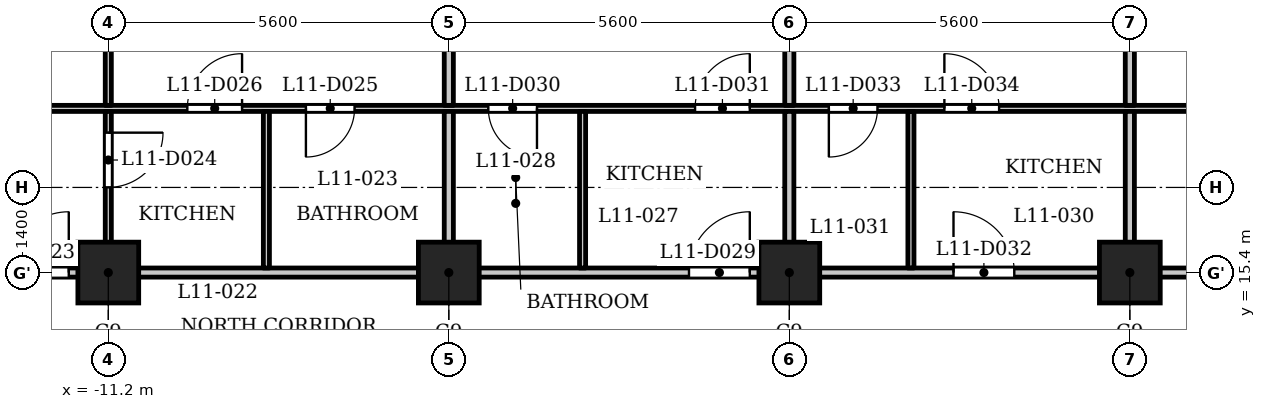
"""IFC4 building model, lengths in metres.
Left out: names, types, materials, properties, quantities, classifications, styles, units other than length and angle.
Written with IfcOpenShell. Run it as: python <this file> out.ifc"""

import sys

from ifc_helpers import new_model, si_unit, direction, frame, frame_2d, origin, origin_2d, place, context, subcontext, project, spatial, rectangle, extrude, element, fill, save


model = new_model("IFC4")
c1 = context("Model", 3, precision=1e-05, world=origin(), true_north=direction((0.0, 1.0)))
c2 = subcontext(c1, "Body", "Model", "MODEL_VIEW")
j1 = project(units=[si_unit("LENGTHUNIT", "METRE"), si_unit("PLANEANGLEUNIT", "RADIAN")], contexts=[c1])
p1 = place(None, origin())
s1 = spatial("IfcSite", under=j1, at=p1, CompositionType="ELEMENT")
p2 = place(p1, origin())
s2 = spatial("IfcBuilding", under=s1, at=p2, CompositionType="ELEMENT")
p3 = place(p2, frame((0.0, 0.0, 48.0)))
s3 = spatial("IfcBuildingStorey", under=s2, at=p3, CompositionType="ELEMENT", Elevation=48.0)
for number, where, z_axis, x_axis in (
    (1, (-11.2, 15.4, 0.0), (0.0, 0.0, 1.0), (1.0, 0.0, 0.0)),
    (2, (-5.6, 15.4, 0.0), (0.0, 0.0, 1.0), (1.0, 0.0, 0.0)),
    (3, (0.0, 15.4, 0.0), (0.0, 0.0, 1.0), (1.0, 0.0, 0.0)),
    (4, (5.6, 15.4, 0.0), (0.0, 0.0, 1.0), (1.0, 0.0, 0.0)),
):
    element("IfcColumn", number, at=place(p3, frame(where, z_axis=z_axis, x_axis=x_axis)), inside=s3, PredefinedType="COLUMN", context=c2, shape_type="SweptSolid", body=[
        extrude(rectangle(XDim=1.0, YDim=1.0, at=origin_2d()), origin(), (0.0, 0.0, 1.0), 3.5),
    ])
p4 = place(p3, frame((-27.484, 15.4, 0.0), z_axis=(0.0, 0.0, 1.0), x_axis=(1.0, 0.0, 0.0)))
e5 = element("IfcWall", 5, at=p4, inside=s3, PredefinedType="PARTITIONING", context=c2, shape_type="SweptSolid", body=[
    extrude(rectangle(XDim=54.968, YDim=0.15, at=frame_2d((27.484, 0.0))), origin(), (0.0, 0.0, 1.0), 3.2),
])
p5 = place(p4, frame((8.784, 0.0, 0.0)))
e6 = element("IfcOpeningElement", 6, at=p5, cuts=e5, PredefinedType="OPENING", context=c2, shape_type="SweptSolid", body=[
    extrude(rectangle(XDim=1.0, YDim=2.1, at=frame_2d((0.5, 1.05))), frame((0.0, 0.085, 0.0), z_axis=(0.0, -1.0, 0.0), x_axis=(1.0, 0.0, 0.0)), (0.0, 0.0, 1.0), 0.17),
])
p6 = place(p4, frame((14.634, 0.0, 0.0)))
e7 = element("IfcOpeningElement", 7, at=p6, cuts=e5, PredefinedType="OPENING", context=c2, shape_type="SweptSolid", body=[
    extrude(rectangle(XDim=1.0, YDim=2.1, at=frame_2d((0.5, 1.05))), frame((0.0, 0.085, 0.0), z_axis=(0.0, -1.0, 0.0), x_axis=(1.0, 0.0, 0.0)), (0.0, 0.0, 1.0), 0.17),
])
p7 = place(p4, frame((25.834, 0.0, 0.0)))
e8 = element("IfcOpeningElement", 8, at=p7, cuts=e5, PredefinedType="OPENING", context=c2, shape_type="SweptSolid", body=[
    extrude(rectangle(XDim=1.0, YDim=2.1, at=frame_2d((0.5, 1.05))), frame((0.0, 0.085, 0.0), z_axis=(0.0, -1.0, 0.0), x_axis=(1.0, 0.0, 0.0)), (0.0, 0.0, 1.0), 0.17),
])
p8 = place(p4, frame((30.184, 0.0, 0.0)))
e9 = element("IfcOpeningElement", 9, at=p8, cuts=e5, PredefinedType="OPENING", context=c2, shape_type="SweptSolid", body=[
    extrude(rectangle(XDim=1.0, YDim=2.1, at=frame_2d((0.5, 1.05))), frame((0.0, 0.085, 0.0), z_axis=(0.0, -1.0, 0.0), x_axis=(1.0, 0.0, 0.0)), (0.0, 0.0, 1.0), 0.17),
])
p9 = place(p4, frame((37.034, 0.0, 0.0)))
e10 = element("IfcOpeningElement", 10, at=p9, cuts=e5, PredefinedType="OPENING", context=c2, shape_type="SweptSolid", body=[
    extrude(rectangle(XDim=1.0, YDim=2.1, at=frame_2d((0.5, 1.05))), frame((0.0, 0.085, 0.0), z_axis=(0.0, -1.0, 0.0), x_axis=(1.0, 0.0, 0.0)), (0.0, 0.0, 1.0), 0.17),
])
p10 = place(p4, frame((48.234, 0.0, 0.0)))
e11 = element("IfcOpeningElement", 11, at=p10, cuts=e5, PredefinedType="OPENING", context=c2, shape_type="SweptSolid", body=[
    extrude(rectangle(XDim=1.0, YDim=2.1, at=frame_2d((0.5, 1.05))), frame((0.0, 0.085, 0.0), z_axis=(0.0, -1.0, 0.0), x_axis=(1.0, 0.0, 0.0)), (0.0, 0.0, 1.0), 0.17),
])
p11 = place(p3, frame((-26.44, 18.1, 0.0), z_axis=(0.0, 0.0, 1.0), x_axis=(1.0, 0.0, 0.0)))
e12 = element("IfcWall", 12, at=p11, inside=s3, PredefinedType="PARTITIONING", context=c2, shape_type="SweptSolid", body=[
    extrude(rectangle(XDim=52.63, YDim=0.1, at=frame_2d((26.315, 0.0))), origin(), (0.0, 0.0, 1.0), 3.2),
])
p12 = place(p11, frame((2.626, 0.0, 0.0)))
e13 = element("IfcOpeningElement", 13, at=p12, cuts=e12, PredefinedType="OPENING", context=c2, shape_type="SweptSolid", body=[
    extrude(rectangle(XDim=0.8, YDim=2.1, at=frame_2d((0.4, 1.05))), frame((0.0, 0.06, 0.0), z_axis=(0.0, -1.0, 0.0), x_axis=(1.0, 0.0, 0.0)), (0.0, 0.0, 1.0), 0.12),
])
p13 = place(p11, frame((7.84, 0.0, 0.0)))
e14 = element("IfcOpeningElement", 14, at=p13, cuts=e12, PredefinedType="OPENING", context=c2, shape_type="SweptSolid", body=[
    extrude(rectangle(XDim=0.9, YDim=2.1, at=frame_2d((0.45, 1.05))), frame((0.0, 0.06, 0.0), z_axis=(0.0, -1.0, 0.0), x_axis=(1.0, 0.0, 0.0)), (0.0, 0.0, 1.0), 0.12),
])
p14 = place(p11, frame((18.49, 0.0, 0.0)))
e15 = element("IfcOpeningElement", 15, at=p14, cuts=e12, PredefinedType="OPENING", context=c2, shape_type="SweptSolid", body=[
    extrude(rectangle(XDim=0.8, YDim=2.1, at=frame_2d((0.4, 1.05))), frame((0.0, 0.06, 0.0), z_axis=(0.0, -1.0, 0.0), x_axis=(1.0, 0.0, 0.0)), (0.0, 0.0, 1.0), 0.12),
])
p15 = place(p11, frame((16.54, 0.0, 0.0)))
e16 = element("IfcOpeningElement", 16, at=p15, cuts=e12, PredefinedType="OPENING", context=c2, shape_type="SweptSolid", body=[
    extrude(rectangle(XDim=0.9, YDim=2.1, at=frame_2d((0.45, 1.05))), frame((0.0, 0.06, 0.0), z_axis=(0.0, -1.0, 0.0), x_axis=(1.0, 0.0, 0.0)), (0.0, 0.0, 1.0), 0.12),
])
p16 = place(p11, frame((10.89, 0.0, 0.0)))
e17 = element("IfcOpeningElement", 17, at=p16, cuts=e12, PredefinedType="OPENING", context=c2, shape_type="SweptSolid", body=[
    extrude(rectangle(XDim=0.9, YDim=2.1, at=frame_2d((0.45, 1.05))), frame((0.0, 0.06, 0.0), z_axis=(0.0, -1.0, 0.0), x_axis=(1.0, 0.0, 0.0)), (0.0, 0.0, 1.0), 0.12),
])
p17 = place(p11, frame((12.94, 0.0, 0.0)))
e18 = element("IfcOpeningElement", 18, at=p17, cuts=e12, PredefinedType="OPENING", context=c2, shape_type="SweptSolid", body=[
    extrude(rectangle(XDim=0.9, YDim=2.1, at=frame_2d((0.45, 1.05))), frame((0.0, 0.06, 0.0), z_axis=(0.0, -1.0, 0.0), x_axis=(1.0, 0.0, 0.0)), (0.0, 0.0, 1.0), 0.12),
])
p18 = place(p11, frame((21.49, 0.0, 0.0)))
e19 = element("IfcOpeningElement", 19, at=p18, cuts=e12, PredefinedType="OPENING", context=c2, shape_type="SweptSolid", body=[
    extrude(rectangle(XDim=0.8, YDim=2.1, at=frame_2d((0.4, 1.05))), frame((0.0, 0.06, 0.0), z_axis=(0.0, -1.0, 0.0), x_axis=(1.0, 0.0, 0.0)), (0.0, 0.0, 1.0), 0.12),
])
p19 = place(p11, frame((24.89, 0.0, 0.0)))
e20 = element("IfcOpeningElement", 20, at=p19, cuts=e12, PredefinedType="OPENING", context=c2, shape_type="SweptSolid", body=[
    extrude(rectangle(XDim=0.9, YDim=2.1, at=frame_2d((0.45, 1.05))), frame((0.0, 0.06, 0.0), z_axis=(0.0, -1.0, 0.0), x_axis=(1.0, 0.0, 0.0)), (0.0, 0.0, 1.0), 0.12),
])
p20 = place(p11, frame((27.09, 0.0, 0.0)))
e21 = element("IfcOpeningElement", 21, at=p20, cuts=e12, PredefinedType="OPENING", context=c2, shape_type="SweptSolid", body=[
    extrude(rectangle(XDim=0.8, YDim=2.1, at=frame_2d((0.4, 1.05))), frame((0.0, 0.06, 0.0), z_axis=(0.0, -1.0, 0.0), x_axis=(1.0, 0.0, 0.0)), (0.0, 0.0, 1.0), 0.12),
])
p21 = place(p11, frame((28.99, 0.0, 0.0)))
e22 = element("IfcOpeningElement", 22, at=p21, cuts=e12, PredefinedType="OPENING", context=c2, shape_type="SweptSolid", body=[
    extrude(rectangle(XDim=0.9, YDim=2.1, at=frame_2d((0.45, 1.05))), frame((0.0, 0.06, 0.0), z_axis=(0.0, -1.0, 0.0), x_axis=(1.0, 0.0, 0.0)), (0.0, 0.0, 1.0), 0.12),
])
p22 = place(p11, frame((41.69, 0.0, 0.0)))
e23 = element("IfcOpeningElement", 23, at=p22, cuts=e12, PredefinedType="OPENING", context=c2, shape_type="SweptSolid", body=[
    extrude(rectangle(XDim=0.8, YDim=2.1, at=frame_2d((0.4, 1.05))), frame((0.0, 0.06, 0.0), z_axis=(0.0, -1.0, 0.0), x_axis=(1.0, 0.0, 0.0)), (0.0, 0.0, 1.0), 0.12),
])
p23 = place(p11, frame((38.99, 0.0, 0.0)))
e24 = element("IfcOpeningElement", 24, at=p23, cuts=e12, PredefinedType="OPENING", context=c2, shape_type="SweptSolid", body=[
    extrude(rectangle(XDim=0.9, YDim=2.1, at=frame_2d((0.45, 1.05))), frame((0.0, 0.06, 0.0), z_axis=(0.0, -1.0, 0.0), x_axis=(1.0, 0.0, 0.0)), (0.0, 0.0, 1.0), 0.12),
])
p24 = place(p11, frame((33.29, 0.0, 0.0)))
e25 = element("IfcOpeningElement", 25, at=p24, cuts=e12, PredefinedType="OPENING", context=c2, shape_type="SweptSolid", body=[
    extrude(rectangle(XDim=0.9, YDim=2.1, at=frame_2d((0.45, 1.05))), frame((0.0, 0.06, 0.0), z_axis=(0.0, -1.0, 0.0), x_axis=(1.0, 0.0, 0.0)), (0.0, 0.0, 1.0), 0.12),
])
p25 = place(p11, frame((35.34, 0.0, 0.0)))
e26 = element("IfcOpeningElement", 26, at=p25, cuts=e12, PredefinedType="OPENING", context=c2, shape_type="SweptSolid", body=[
    extrude(rectangle(XDim=0.9, YDim=2.1, at=frame_2d((0.45, 1.05))), frame((0.0, 0.06, 0.0), z_axis=(0.0, -1.0, 0.0), x_axis=(1.0, 0.0, 0.0)), (0.0, 0.0, 1.0), 0.12),
])
p26 = place(p11, frame((50.74, 0.0, 0.0)))
e27 = element("IfcOpeningElement", 27, at=p26, cuts=e12, PredefinedType="OPENING", context=c2, shape_type="SweptSolid", body=[
    extrude(rectangle(XDim=0.8, YDim=2.1, at=frame_2d((0.4, 1.05))), frame((0.0, 0.06, 0.0), z_axis=(0.0, -1.0, 0.0), x_axis=(1.0, 0.0, 0.0)), (0.0, 0.0, 1.0), 0.12),
])
p27 = place(p11, frame((47.29, 0.0, 0.0)))
e28 = element("IfcOpeningElement", 28, at=p27, cuts=e12, PredefinedType="OPENING", context=c2, shape_type="SweptSolid", body=[
    extrude(rectangle(XDim=0.9, YDim=2.1, at=frame_2d((0.45, 1.05))), frame((0.0, 0.06, 0.0), z_axis=(0.0, -1.0, 0.0), x_axis=(1.0, 0.0, 0.0)), (0.0, 0.0, 1.0), 0.12),
])
p28 = place(p3, frame((-11.2, 15.475, 0.0), z_axis=(0.0, 0.0, 1.0), x_axis=(0.0, 1.0, 0.0)))
e29 = element("IfcWall", 29, at=p28, inside=s3, PredefinedType="PARTITIONING", context=c2, shape_type="SweptSolid", body=[
    extrude(rectangle(XDim=2.575, YDim=0.1, at=frame_2d((1.288, 0.0))), origin(), (0.0, 0.0, 1.0), 3.2),
])
p29 = place(p28, frame((1.326, 0.0, 0.0)))
e30 = element("IfcOpeningElement", 30, at=p29, cuts=e29, PredefinedType="OPENING", context=c2, shape_type="SweptSolid", body=[
    extrude(rectangle(XDim=0.9, YDim=2.1, at=frame_2d((0.45, 1.05))), frame((0.0, 0.06, 0.0), z_axis=(0.0, -1.0, 0.0), x_axis=(1.0, 0.0, 0.0)), (0.0, 0.0, 1.0), 0.12),
])
p30 = place(p3, frame((-11.2, 18.15, 0.0), z_axis=(0.0, 0.0, 1.0), x_axis=(0.0, 1.0, 0.0)))
e31 = element("IfcWall", 31, at=p30, inside=s3, PredefinedType="PARTITIONING", context=c2, shape_type="SweptSolid", body=[
    extrude(rectangle(XDim=4.98, YDim=0.1, at=frame_2d((2.49, 0.0))), origin(), (0.0, 0.0, 1.0), 3.2),
])
p31 = place(p3, frame((-8.6, 15.475, 0.0), z_axis=(0.0, 0.0, 1.0), x_axis=(0.0, 1.0, 0.0)))
e32 = element("IfcWall", 32, at=p31, inside=s3, PredefinedType="PARTITIONING", context=c2, shape_type="SweptSolid", body=[
    extrude(rectangle(XDim=2.575, YDim=0.1, at=frame_2d((1.288, 0.0))), origin(), (0.0, 0.0, 1.0), 3.2),
])
p32 = place(p3, frame((-5.6, 15.475, 0.0), z_axis=(0.0, 0.0, 1.0), x_axis=(0.0, 1.0, 0.0)))
e33 = element("IfcWall", 33, at=p32, inside=s3, PredefinedType="PARTITIONING", context=c2, shape_type="SweptSolid", body=[
    extrude(rectangle(XDim=2.575, YDim=0.15, at=frame_2d((1.288, 0.0))), origin(), (0.0, 0.0, 1.0), 3.2),
])
p33 = place(p3, frame((-5.6, 18.15, 0.0), z_axis=(0.0, 0.0, 1.0), x_axis=(0.0, 1.0, 0.0)))
e34 = element("IfcWall", 34, at=p33, inside=s3, PredefinedType="PARTITIONING", context=c2, shape_type="SweptSolid", body=[
    extrude(rectangle(XDim=4.98, YDim=0.15, at=frame_2d((2.49, 0.0))), origin(), (0.0, 0.0, 1.0), 3.2),
])
p34 = place(p3, frame((-3.4, 15.475, 0.0), z_axis=(0.0, 0.0, 1.0), x_axis=(0.0, 1.0, 0.0)))
e35 = element("IfcWall", 35, at=p34, inside=s3, PredefinedType="PARTITIONING", context=c2, shape_type="SweptSolid", body=[
    extrude(rectangle(XDim=2.575, YDim=0.1, at=frame_2d((1.288, 0.0))), origin(), (0.0, 0.0, 1.0), 3.2),
])
p35 = place(p3, frame((0.0, 15.475, 0.0), z_axis=(0.0, 0.0, 1.0), x_axis=(0.0, 1.0, 0.0)))
e36 = element("IfcWall", 36, at=p35, inside=s3, PredefinedType="PARTITIONING", context=c2, shape_type="SweptSolid", body=[
    extrude(rectangle(XDim=2.575, YDim=0.15, at=frame_2d((1.288, 0.0))), origin(), (0.0, 0.0, 1.0), 3.2),
])
p36 = place(p3, frame((0.0, 18.15, 0.0), z_axis=(0.0, 0.0, 1.0), x_axis=(0.0, 1.0, 0.0)))
e37 = element("IfcWall", 37, at=p36, inside=s3, PredefinedType="PARTITIONING", context=c2, shape_type="SweptSolid", body=[
    extrude(rectangle(XDim=4.98, YDim=0.15, at=frame_2d((2.49, 0.0))), origin(), (0.0, 0.0, 1.0), 3.2),
])
p37 = place(p3, frame((2.0, 15.475, 0.0), z_axis=(0.0, 0.0, 1.0), x_axis=(0.0, 1.0, 0.0)))
e38 = element("IfcWall", 38, at=p37, inside=s3, PredefinedType="PARTITIONING", context=c2, shape_type="SweptSolid", body=[
    extrude(rectangle(XDim=2.575, YDim=0.1, at=frame_2d((1.288, 0.0))), origin(), (0.0, 0.0, 1.0), 3.2),
])
p38 = place(p3, frame((5.6, 15.475, 0.0), z_axis=(0.0, 0.0, 1.0), x_axis=(0.0, 1.0, 0.0)))
e39 = element("IfcWall", 39, at=p38, inside=s3, PredefinedType="PARTITIONING", context=c2, shape_type="SweptSolid", body=[
    extrude(rectangle(XDim=2.575, YDim=0.15, at=frame_2d((1.288, 0.0))), origin(), (0.0, 0.0, 1.0), 3.2),
])
p39 = place(p3, frame((5.6, 18.15, 0.0), z_axis=(0.0, 0.0, 1.0), x_axis=(0.0, 1.0, 0.0)))
e40 = element("IfcWall", 40, at=p39, inside=s3, PredefinedType="PARTITIONING", context=c2, shape_type="SweptSolid", body=[
    extrude(rectangle(XDim=4.98, YDim=0.15, at=frame_2d((2.49, 0.0))), origin(), (0.0, 0.0, 1.0), 3.2),
])
p40 = place(p6, origin())
e41 = element("IfcDoor", 41, at=p40, inside=s3, OperationType="SINGLE_SWING_LEFT", PredefinedType="DOOR", context=c2, shape_type="SweptSolid", body=[
    extrude(rectangle(XDim=1.0, YDim=2.1, at=frame_2d((0.5, 1.05))), frame((0.0, 0.025, 0.0), z_axis=(0.0, -1.0, 0.0), x_axis=(1.0, 0.0, 0.0)), (0.0, 0.0, 1.0), 0.05),
])
fill(e7, e41)
p41 = place(p29, origin())
e42 = element("IfcDoor", 42, at=p41, inside=s3, OperationType="SINGLE_SWING_RIGHT", PredefinedType="DOOR", context=c2, shape_type="SweptSolid", body=[
    extrude(rectangle(XDim=0.9, YDim=2.1, at=frame_2d((0.45, 1.05))), frame((0.0, 0.025, 0.0), z_axis=(0.0, -1.0, 0.0), x_axis=(1.0, 0.0, 0.0)), (0.0, 0.0, 1.0), 0.05),
])
fill(e30, e42)
p42 = place(p14, origin())
e43 = element("IfcDoor", 43, at=p42, inside=s3, OperationType="SINGLE_SWING_LEFT", PredefinedType="DOOR", context=c2, shape_type="SweptSolid", body=[
    extrude(rectangle(XDim=0.8, YDim=2.1, at=frame_2d((0.4, 1.05))), frame((0.0, 0.025, 0.0), z_axis=(0.0, -1.0, 0.0), x_axis=(1.0, 0.0, 0.0)), (0.0, 0.0, 1.0), 0.05),
])
fill(e15, e43)
p43 = place(p15, origin())
e44 = element("IfcDoor", 44, at=p43, inside=s3, OperationType="SINGLE_SWING_LEFT", PredefinedType="DOOR", context=c2, shape_type="SweptSolid", body=[
    extrude(rectangle(XDim=0.9, YDim=2.1, at=frame_2d((0.45, 1.05))), frame((0.0, 0.025, 0.0), z_axis=(0.0, -1.0, 0.0), x_axis=(1.0, 0.0, 0.0)), (0.0, 0.0, 1.0), 0.05),
])
fill(e16, e44)
p44 = place(p7, origin())
e45 = element("IfcDoor", 45, at=p44, inside=s3, OperationType="SINGLE_SWING_LEFT", PredefinedType="DOOR", context=c2, shape_type="SweptSolid", body=[
    extrude(rectangle(XDim=1.0, YDim=2.1, at=frame_2d((0.5, 1.05))), frame((0.0, 0.025, 0.0), z_axis=(0.0, -1.0, 0.0), x_axis=(1.0, 0.0, 0.0)), (0.0, 0.0, 1.0), 0.05),
])
fill(e8, e45)
p45 = place(p18, origin())
e46 = element("IfcDoor", 46, at=p45, inside=s3, OperationType="SINGLE_SWING_RIGHT", PredefinedType="DOOR", context=c2, shape_type="SweptSolid", body=[
    extrude(rectangle(XDim=0.8, YDim=2.1, at=frame_2d((0.4, 1.05))), frame((0.0, 0.025, 0.0), z_axis=(0.0, -1.0, 0.0), x_axis=(1.0, 0.0, 0.0)), (0.0, 0.0, 1.0), 0.05),
])
fill(e19, e46)
p46 = place(p19, origin())
e47 = element("IfcDoor", 47, at=p46, inside=s3, OperationType="SINGLE_SWING_LEFT", PredefinedType="DOOR", context=c2, shape_type="SweptSolid", body=[
    extrude(rectangle(XDim=0.9, YDim=2.1, at=frame_2d((0.45, 1.05))), frame((0.0, 0.025, 0.0), z_axis=(0.0, -1.0, 0.0), x_axis=(1.0, 0.0, 0.0)), (0.0, 0.0, 1.0), 0.05),
])
fill(e20, e47)
p47 = place(p8, origin())
e48 = element("IfcDoor", 48, at=p47, inside=s3, OperationType="SINGLE_SWING_RIGHT", PredefinedType="DOOR", context=c2, shape_type="SweptSolid", body=[
    extrude(rectangle(XDim=1.0, YDim=2.1, at=frame_2d((0.5, 1.05))), frame((0.0, 0.025, 0.0), z_axis=(0.0, -1.0, 0.0), x_axis=(1.0, 0.0, 0.0)), (0.0, 0.0, 1.0), 0.05),
])
fill(e9, e48)
p48 = place(p20, origin())
e49 = element("IfcDoor", 49, at=p48, inside=s3, OperationType="SINGLE_SWING_LEFT", PredefinedType="DOOR", context=c2, shape_type="SweptSolid", body=[
    extrude(rectangle(XDim=0.8, YDim=2.1, at=frame_2d((0.4, 1.05))), frame((0.0, 0.025, 0.0), z_axis=(0.0, -1.0, 0.0), x_axis=(1.0, 0.0, 0.0)), (0.0, 0.0, 1.0), 0.05),
])
fill(e21, e49)
p49 = place(p21, origin())
e50 = element("IfcDoor", 50, at=p49, inside=s3, OperationType="SINGLE_SWING_RIGHT", PredefinedType="DOOR", context=c2, shape_type="SweptSolid", body=[
    extrude(rectangle(XDim=0.9, YDim=2.1, at=frame_2d((0.45, 1.05))), frame((0.0, 0.025, 0.0), z_axis=(0.0, -1.0, 0.0), x_axis=(1.0, 0.0, 0.0)), (0.0, 0.0, 1.0), 0.05),
])
fill(e22, e50)
save(model, sys.argv[1])
